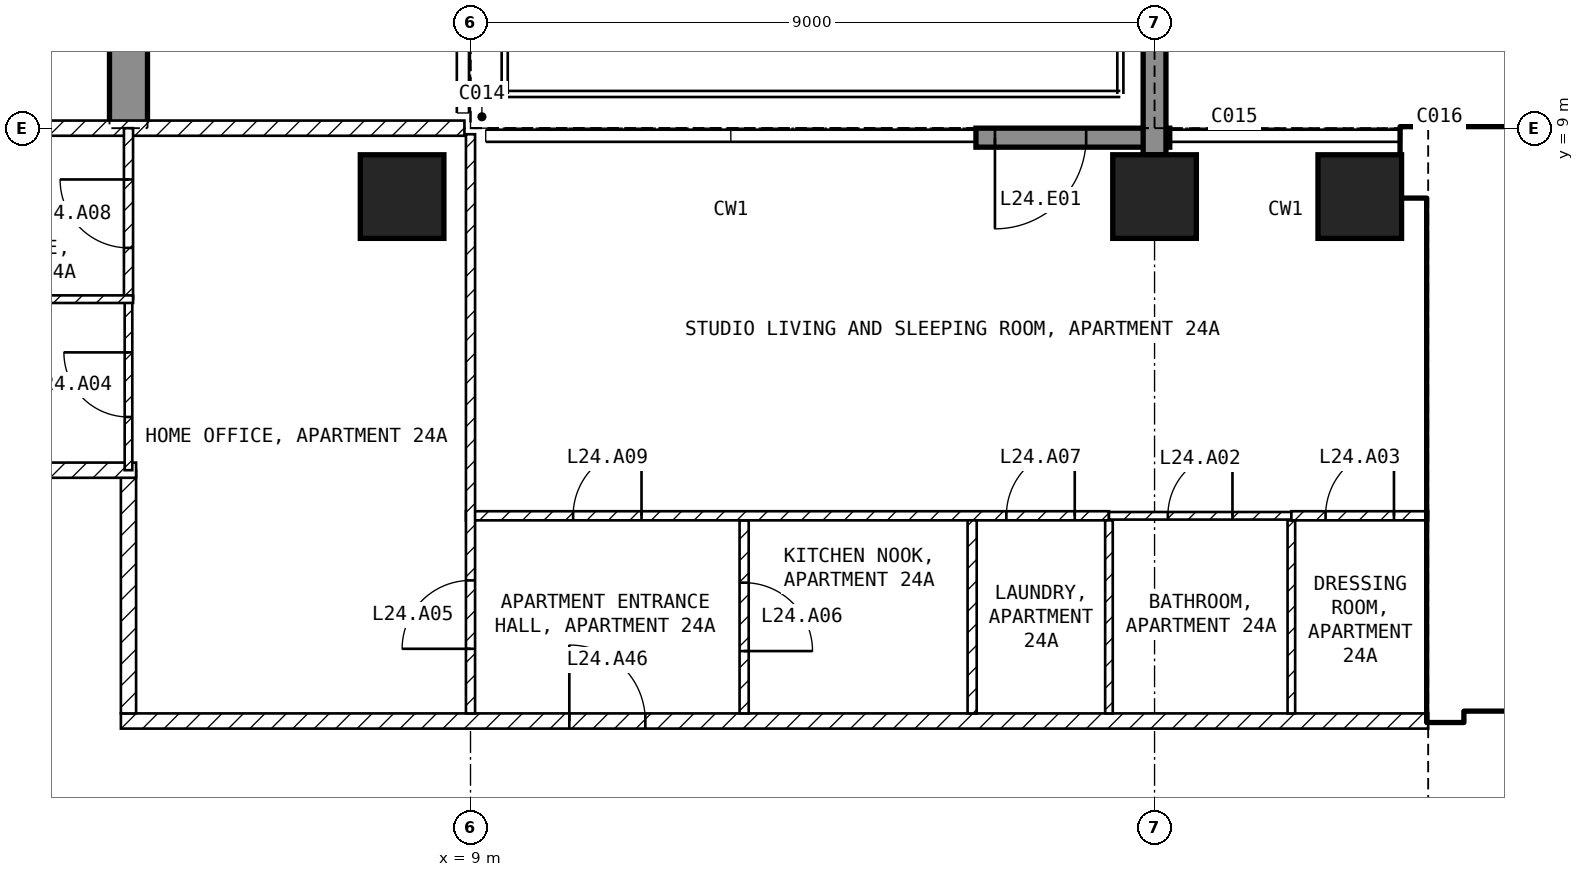
"""IFC4 building model, lengths in metres.
Left out: names, types, materials, properties, quantities, classifications, styles, units other than length and angle.
Written with IfcOpenShell. Run it as: python <this file> out.ifc"""

import sys

from ifc_helpers import new_model, si_unit, direction, frame, frame_2d, origin, origin_2d, place, context, subcontext, project, spatial, polyline, rectangle, outline, extrude, element, fill, save


model = new_model("IFC4")
c1 = context("Model", 3, precision=1e-05, world=origin(), true_north=direction((0.0, 1.0)))
c2 = subcontext(c1, "Body", "Model", "MODEL_VIEW")
j1 = project(units=[si_unit("LENGTHUNIT", "METRE"), si_unit("PLANEANGLEUNIT", "RADIAN")], contexts=[c1])
p1 = place(None, origin())
s1 = spatial("IfcSite", under=j1, at=p1, CompositionType="ELEMENT")
p2 = place(p1, origin())
s2 = spatial("IfcBuilding", under=s1, at=p2, CompositionType="ELEMENT")
p3 = place(p2, frame((0.0, 0.0, 105.9)))
s3 = spatial("IfcBuildingStorey", under=s2, at=p3, CompositionType="ELEMENT", Elevation=105.9)
for number, where, z_axis, x_axis in (
    (1, (8.1, 8.1, -0.25), (0.0, 0.0, 1.0), (1.0, 0.0, 0.0)),
    (2, (18.0, 8.1, -0.25), (0.0, 0.0, 1.0), (1.0, 0.0, 0.0)),
    (3, (20.7, 8.1, -0.25), (0.0, 0.0, 1.0), (1.0, 0.0, 0.0)),
):
    element("IfcColumn", number, at=place(p3, frame(where, z_axis=z_axis, x_axis=x_axis)), inside=s3, PredefinedType="COLUMN", context=c2, shape_type="SweptSolid", body=[
        extrude(rectangle(XDim=1.1, YDim=1.1, at=origin_2d()), origin(), (0.0, 0.0, 1.0), 3.5),
    ])
p4 = place(p3, frame((4.25, 9.0, -0.25), z_axis=(1.0, 0.0, 0.0), x_axis=(0.0, 1.0, 0.0)))
e4 = element("IfcWall", 4, at=p4, inside=s3, PredefinedType="SHEAR", context=c2, shape_type="SweptSolid", body=[
    extrude(outline(polyline([(0.0, 0.0), (2.1, 0.0), (2.1, 2.65), (4.5, 2.65), (4.5, 0.0), (9.9, 0.0), (9.9, 2.65), (12.3, 2.65), (12.3, 0.0), (16.55, 0.0), (16.55, 3.5), (0.0, 3.5), (0.0, 0.0)])), origin(), (0.0, 0.0, 1.0), 0.5),
])
p5 = place(p3, frame((18.2, 8.875, 0.0), z_axis=(0.0, 0.0, 1.0), x_axis=(-1.0, 0.0, 0.0)))
e5 = element("IfcWall", 5, at=p5, inside=s3, PredefinedType="SOLIDWALL", context=c2, shape_type="SweptSolid", body=[
    extrude(rectangle(XDim=2.55, YDim=0.25, at=frame_2d((1.275, 0.0))), origin(), (0.0, 0.0, 1.0), 3.25),
])
p6 = place(p5, frame((1.1, 0.0, 0.0)))
e6 = element("IfcOpeningElement", 6, at=p6, cuts=e5, PredefinedType="OPENING", context=c2, shape_type="SweptSolid", body=[
    extrude(rectangle(XDim=1.2, YDim=2.4, at=frame_2d((0.6, 1.2))), frame((0.0, 0.135, 0.0), z_axis=(0.0, -1.0, 0.0), x_axis=(1.0, 0.0, 0.0)), (0.0, 0.0, 1.0), 0.27),
])
p7 = place(p3, frame((18.0, 8.65, 0.0), z_axis=(0.0, 0.0, 1.0), x_axis=(0.0, 1.0, 0.0)))
e7 = element("IfcWall", 7, at=p7, inside=s3, PredefinedType="SOLIDWALL", context=c2, shape_type="SweptSolid", body=[
    extrude(rectangle(XDim=3.09, YDim=0.3, at=frame_2d((1.545, 0.0))), origin(), (0.0, 0.0, 1.0), 3.25),
])
p8 = place(p3, frame((21.25, 8.55, 0.0), z_axis=(0.0, 0.0, 1.0), x_axis=(1.0, 0.0, 0.0)))
e8 = element("IfcWall", 8, at=p8, inside=s3, PredefinedType="SHEAR", context=c2, shape_type="SweptSolid", body=[
    extrude(rectangle(XDim=8.2, YDim=0.9, at=frame_2d((4.1, 0.0))), origin(), (0.0, 0.0, 1.0), 3.25),
])
p9 = place(p3, frame((21.825, 1.2, 0.0), z_axis=(0.0, 0.0, 1.0), x_axis=(0.0, 1.0, 0.0)))
e9 = element("IfcWall", 9, at=p9, inside=s3, PredefinedType="SHEAR", context=c2, shape_type="SweptSolid", body=[
    extrude(rectangle(XDim=6.9, YDim=0.45, at=frame_2d((3.45, 0.0))), origin(), (0.0, 0.0, 1.0), 3.25),
])
p10 = place(p3, frame((22.05, 1.45, 0.0), z_axis=(0.0, 0.0, 1.0), x_axis=(1.0, 0.0, 0.0)))
e10 = element("IfcWall", 10, at=p10, inside=s3, PredefinedType="SOLIDWALL", context=c2, shape_type="SweptSolid", body=[
    extrude(rectangle(XDim=11.0, YDim=0.2, at=frame_2d((5.5, 0.0))), origin(), (0.0, 0.0, 1.0), 3.25),
])
p11 = place(p10, frame((0.75, 0.0, 0.0)))
e11 = element("IfcOpeningElement", 11, at=p11, cuts=e10, PredefinedType="OPENING", context=c2, shape_type="SweptSolid", body=[
    extrude(rectangle(XDim=1.0, YDim=2.1, at=frame_2d((0.5, 1.05))), frame((0.0, 0.11, 0.0), z_axis=(0.0, -1.0, 0.0), x_axis=(1.0, 0.0, 0.0)), (0.0, 0.0, 1.0), 0.22),
])
p12 = place(p10, frame((3.25, 0.0, 0.0)))
e12 = element("IfcOpeningElement", 12, at=p12, cuts=e10, PredefinedType="OPENING", context=c2, shape_type="SweptSolid", body=[
    extrude(rectangle(XDim=1.0, YDim=2.1, at=frame_2d((0.5, 1.05))), frame((0.0, 0.11, 0.0), z_axis=(0.0, -1.0, 0.0), x_axis=(1.0, 0.0, 0.0)), (0.0, 0.0, 1.0), 0.22),
])
p13 = place(p10, frame((9.075, 0.0, 0.0)))
e13 = element("IfcOpeningElement", 13, at=p13, cuts=e10, PredefinedType="OPENING", context=c2, shape_type="SweptSolid", body=[
    extrude(rectangle(XDim=0.9, YDim=2.1, at=frame_2d((0.45, 1.05))), frame((0.0, 0.11, 0.0), z_axis=(0.0, -1.0, 0.0), x_axis=(1.0, 0.0, 0.0)), (0.0, 0.0, 1.0), 0.22),
])
p14 = place(p3, frame((22.05, 5.15, 0.0), z_axis=(0.0, 0.0, 1.0), x_axis=(1.0, 0.0, 0.0)))
e14 = element("IfcWall", 14, at=p14, inside=s3, PredefinedType="SOLIDWALL", context=c2, shape_type="SweptSolid", body=[
    extrude(rectangle(XDim=6.3, YDim=0.2, at=frame_2d((3.15, 0.0))), origin(), (0.0, 0.0, 1.0), 3.25),
])
p15 = place(p14, frame((0.2, 0.0, 0.0)))
e15 = element("IfcOpeningElement", 15, at=p15, cuts=e14, PredefinedType="OPENING", context=c2, shape_type="SweptSolid", body=[
    extrude(rectangle(XDim=1.0, YDim=2.1, at=frame_2d((0.5, 1.05))), frame((0.0, 0.11, 0.0), z_axis=(0.0, -1.0, 0.0), x_axis=(1.0, 0.0, 0.0)), (0.0, 0.0, 1.0), 0.22),
])
p16 = place(p3, frame((4.4, 1.2, 0.0), z_axis=(0.0, 0.0, 1.0), x_axis=(1.0, 0.0, 0.0)))
e16 = element("IfcWall", 16, at=p16, inside=s3, PredefinedType="PARTITIONING", context=c2, shape_type="SweptSolid", body=[
    extrude(rectangle(XDim=17.2, YDim=0.2, at=frame_2d((8.6, 0.0))), origin(), (0.0, 0.0, 1.0), 3.25),
])
p17 = place(p16, frame((5.9, 0.0, 0.0)))
e17 = element("IfcOpeningElement", 17, at=p17, cuts=e16, PredefinedType="OPENING", context=c2, shape_type="SweptSolid", body=[
    extrude(rectangle(XDim=1.0, YDim=2.1, at=frame_2d((0.5, 1.05))), frame((0.0, 0.11, 0.0), z_axis=(0.0, -1.0, 0.0), x_axis=(1.0, 0.0, 0.0)), (0.0, 0.0, 1.0), 0.22),
])
p18 = place(p3, frame((4.5, 4.5, 0.0), z_axis=(0.0, 0.0, 1.0), x_axis=(0.0, -1.0, 0.0)))
e18 = element("IfcWall", 18, at=p18, inside=s3, PredefinedType="PARTITIONING", context=c2, shape_type="SweptSolid", body=[
    extrude(rectangle(XDim=3.2, YDim=0.2, at=frame_2d((1.6, 0.0))), origin(), (0.0, 0.0, 1.0), 3.25),
])
p19 = place(p3, frame((1.1, 4.5, 0.0), z_axis=(0.0, 0.0, 1.0), x_axis=(1.0, 0.0, 0.0)))
e19 = element("IfcWall", 19, at=p19, inside=s3, PredefinedType="PARTITIONING", context=c2, shape_type="SweptSolid", body=[
    extrude(rectangle(XDim=3.5, YDim=0.2, at=frame_2d((1.75, 0.0))), origin(), (0.0, 0.0, 1.0), 3.25),
])
p20 = place(p3, frame((-8.92, 9.0, 0.0), z_axis=(0.0, 0.0, 1.0), x_axis=(1.0, 0.0, 0.0)))
e20 = element("IfcWall", 20, at=p20, inside=s3, PredefinedType="PARTITIONING", context=c2, shape_type="SweptSolid", body=[
    extrude(rectangle(XDim=17.84, YDim=0.2, at=frame_2d((8.92, 0.0))), origin(), (0.0, 0.0, 1.0), 3.25),
])
p21 = place(p20, frame((8.42, 0.0, 0.0)))
e21 = element("IfcOpeningElement", 21, at=p21, cuts=e20, PredefinedType="OPENING", context=c2, shape_type="SweptSolid", body=[
    extrude(rectangle(XDim=1.0, YDim=2.1, at=frame_2d((0.5, 1.05))), frame((0.0, 0.11, 0.0), z_axis=(0.0, -1.0, 0.0), x_axis=(1.0, 0.0, 0.0)), (0.0, 0.0, 1.0), 0.22),
])
p22 = place(p3, frame((12.6, 3.84, 0.0), z_axis=(0.0, 0.0, 1.0), x_axis=(0.0, -1.0, 0.0)))
e22 = element("IfcWall", 22, at=p22, inside=s3, PredefinedType="PARTITIONING", context=c2, shape_type="SweptSolid", body=[
    extrude(rectangle(XDim=2.54, YDim=0.12, at=frame_2d((1.27, 0.0))), origin(), (0.0, 0.0, 1.0), 3.25),
])
p23 = place(p22, frame((0.82, 0.0, 0.0)))
e23 = element("IfcOpeningElement", 23, at=p23, cuts=e22, PredefinedType="OPENING", context=c2, shape_type="SweptSolid", body=[
    extrude(rectangle(XDim=0.9, YDim=2.1, at=frame_2d((0.45, 1.05))), frame((0.0, 0.07, 0.0), z_axis=(0.0, -1.0, 0.0), x_axis=(1.0, 0.0, 0.0)), (0.0, 0.0, 1.0), 0.14),
])
p24 = place(p3, frame((8.94, 3.9, 0.0), z_axis=(0.0, 0.0, 1.0), x_axis=(1.0, 0.0, 0.0)))
e24 = element("IfcWall", 24, at=p24, inside=s3, PredefinedType="PARTITIONING", context=c2, shape_type="SweptSolid", body=[
    extrude(rectangle(XDim=8.46, YDim=0.12, at=frame_2d((4.23, 0.0))), origin(), (0.0, 0.0, 1.0), 3.25),
])
p25 = place(p24, frame((7.11, 0.0, 0.0)))
e25 = element("IfcOpeningElement", 25, at=p25, cuts=e24, PredefinedType="OPENING", context=c2, shape_type="SweptSolid", body=[
    extrude(rectangle(XDim=0.9, YDim=2.1, at=frame_2d((0.45, 1.05))), frame((0.0, 0.07, 0.0), z_axis=(0.0, -1.0, 0.0), x_axis=(1.0, 0.0, 0.0)), (0.0, 0.0, 1.0), 0.14),
])
p26 = place(p24, frame((1.41, 0.0, 0.0)))
e26 = element("IfcOpeningElement", 26, at=p26, cuts=e24, PredefinedType="OPENING", context=c2, shape_type="SweptSolid", body=[
    extrude(rectangle(XDim=0.9, YDim=2.1, at=frame_2d((0.45, 1.05))), frame((0.0, 0.07, 0.0), z_axis=(0.0, -1.0, 0.0), x_axis=(1.0, 0.0, 0.0)), (0.0, 0.0, 1.0), 0.14),
])
p27 = place(p3, frame((9.0, 1.3, 0.0), z_axis=(0.0, 0.0, 1.0), x_axis=(0.0, 1.0, 0.0)))
e27 = element("IfcWall", 27, at=p27, inside=s3, PredefinedType="PARTITIONING", context=c2, shape_type="SweptSolid", body=[
    extrude(rectangle(XDim=7.62, YDim=0.12, at=frame_2d((3.81, 0.0))), origin(), (0.0, 0.0, 1.0), 3.25),
])
p28 = place(p27, frame((0.85, 0.0, 0.0)))
e28 = element("IfcOpeningElement", 28, at=p28, cuts=e27, PredefinedType="OPENING", context=c2, shape_type="SweptSolid", body=[
    extrude(rectangle(XDim=0.9, YDim=2.1, at=frame_2d((0.45, 1.05))), frame((0.0, 0.07, 0.0), z_axis=(0.0, -1.0, 0.0), x_axis=(1.0, 0.0, 0.0)), (0.0, 0.0, 1.0), 0.14),
])
p29 = place(p3, frame((15.6, 3.84, 0.0), z_axis=(0.0, 0.0, 1.0), x_axis=(0.0, -1.0, 0.0)))
e29 = element("IfcWall", 29, at=p29, inside=s3, PredefinedType="PARTITIONING", context=c2, shape_type="SweptSolid", body=[
    extrude(rectangle(XDim=2.54, YDim=0.12, at=frame_2d((1.27, 0.0))), origin(), (0.0, 0.0, 1.0), 3.25),
])
for number, where, z_axis, x_axis in (
    (30, (17.4, 3.84, 0.0), (0.0, 0.0, 1.0), (0.0, -1.0, 0.0)),
    (31, (19.8, 3.84, 0.0), (0.0, 0.0, 1.0), (0.0, -1.0, 0.0)),
):
    element("IfcWall", number, at=place(p3, frame(where, z_axis=z_axis, x_axis=x_axis)), inside=s3, PredefinedType="PARTITIONING", context=c2, shape_type="SweptSolid", body=[
        extrude(rectangle(XDim=2.54, YDim=0.1, at=frame_2d((1.27, 0.0))), origin(), (0.0, 0.0, 1.0), 3.25),
    ])
p30 = place(p3, frame((17.4, 3.9, 0.0), z_axis=(0.0, 0.0, 1.0), x_axis=(1.0, 0.0, 0.0)))
e32 = element("IfcWall", 32, at=p30, inside=s3, PredefinedType="PARTITIONING", context=c2, shape_type="SweptSolid", body=[
    extrude(rectangle(XDim=2.4, YDim=0.1, at=frame_2d((1.2, 0.0))), origin(), (0.0, 0.0, 1.0), 3.25),
])
p31 = place(p30, frame((0.775, 0.0, 0.0)))
e33 = element("IfcOpeningElement", 33, at=p31, cuts=e32, PredefinedType="OPENING", context=c2, shape_type="SweptSolid", body=[
    extrude(rectangle(XDim=0.85, YDim=2.1, at=frame_2d((0.425, 1.05))), frame((0.0, 0.06, 0.0), z_axis=(0.0, -1.0, 0.0), x_axis=(1.0, 0.0, 0.0)), (0.0, 0.0, 1.0), 0.12),
])
p32 = place(p3, frame((19.8, 3.9, 0.0), z_axis=(0.0, 0.0, 1.0), x_axis=(1.0, 0.0, 0.0)))
e34 = element("IfcWall", 34, at=p32, inside=s3, PredefinedType="PARTITIONING", context=c2, shape_type="SweptSolid", body=[
    extrude(rectangle(XDim=1.8, YDim=0.12, at=frame_2d((0.9, 0.0))), origin(), (0.0, 0.0, 1.0), 3.25),
])
p33 = place(p32, frame((0.45, 0.0, 0.0)))
e35 = element("IfcOpeningElement", 35, at=p33, cuts=e34, PredefinedType="OPENING", context=c2, shape_type="SweptSolid", body=[
    extrude(rectangle(XDim=0.9, YDim=2.1, at=frame_2d((0.45, 1.05))), frame((0.0, 0.07, 0.0), z_axis=(0.0, -1.0, 0.0), x_axis=(1.0, 0.0, 0.0)), (0.0, 0.0, 1.0), 0.14),
])
p34 = place(p3, frame((4.5, 4.5, 0.0), z_axis=(0.0, 0.0, 1.0), x_axis=(0.0, 1.0, 0.0)))
e36 = element("IfcWall", 36, at=p34, inside=s3, PredefinedType="PARTITIONING", context=c2, shape_type="SweptSolid", body=[
    extrude(rectangle(XDim=2.25, YDim=0.1, at=frame_2d((1.125, 0.0))), origin(), (0.0, 0.0, 1.0), 3.25),
])
p35 = place(p34, frame((0.7, 0.0, 0.0)))
e37 = element("IfcOpeningElement", 37, at=p35, cuts=e36, PredefinedType="OPENING", context=c2, shape_type="SweptSolid", body=[
    extrude(rectangle(XDim=0.85, YDim=2.1, at=frame_2d((0.425, 1.05))), frame((0.0, 0.06, 0.0), z_axis=(0.0, -1.0, 0.0), x_axis=(1.0, 0.0, 0.0)), (0.0, 0.0, 1.0), 0.12),
])
p36 = place(p3, frame((4.5, 6.75, 0.0), z_axis=(0.0, 0.0, 1.0), x_axis=(0.0, 1.0, 0.0)))
e38 = element("IfcWall", 38, at=p36, inside=s3, PredefinedType="PARTITIONING", context=c2, shape_type="SweptSolid", body=[
    extrude(rectangle(XDim=2.25, YDim=0.12, at=frame_2d((1.125, 0.0))), origin(), (0.0, 0.0, 1.0), 3.25),
])
p37 = place(p36, frame((0.675, 0.0, 0.0)))
e39 = element("IfcOpeningElement", 39, at=p37, cuts=e38, PredefinedType="OPENING", context=c2, shape_type="SweptSolid", body=[
    extrude(rectangle(XDim=0.9, YDim=2.1, at=frame_2d((0.45, 1.05))), frame((0.0, 0.07, 0.0), z_axis=(0.0, -1.0, 0.0), x_axis=(1.0, 0.0, 0.0)), (0.0, 0.0, 1.0), 0.14),
])
p38 = place(p3, frame((1.1, 6.75, 0.0), z_axis=(0.0, 0.0, 1.0), x_axis=(1.0, 0.0, 0.0)))
e40 = element("IfcWall", 40, at=p38, inside=s3, PredefinedType="PARTITIONING", context=c2, shape_type="SweptSolid", body=[
    extrude(rectangle(XDim=3.46, YDim=0.1, at=frame_2d((1.73, 0.0))), origin(), (0.0, 0.0, 1.0), 3.25),
])
p39 = place(p6, origin())
e41 = element("IfcDoor", 41, at=p39, inside=s3, OperationType="SINGLE_SWING_RIGHT", PredefinedType="DOOR", context=c2, shape_type="SweptSolid", body=[
    extrude(rectangle(XDim=1.2, YDim=2.4, at=frame_2d((0.6, 1.2))), frame((0.0, 0.025, 0.0), z_axis=(0.0, -1.0, 0.0), x_axis=(1.0, 0.0, 0.0)), (0.0, 0.0, 1.0), 0.05),
])
fill(e6, e41)
p40 = place(p15, origin())
e42 = element("IfcDoor", 42, at=p40, inside=s3, OperationType="SINGLE_SWING_LEFT", PredefinedType="DOOR", context=c2, shape_type="SweptSolid", body=[
    extrude(rectangle(XDim=1.0, YDim=2.1, at=frame_2d((0.5, 1.05))), frame((0.0, 0.025, 0.0), z_axis=(0.0, -1.0, 0.0), x_axis=(1.0, 0.0, 0.0)), (0.0, 0.0, 1.0), 0.05),
])
fill(e15, e42)
p41 = place(p31, origin())
e43 = element("IfcDoor", 43, at=p41, inside=s3, OperationType="SINGLE_SWING_RIGHT", PredefinedType="DOOR", context=c2, shape_type="SweptSolid", body=[
    extrude(rectangle(XDim=0.85, YDim=2.1, at=frame_2d((0.425, 1.05))), frame((0.0, 0.025, 0.0), z_axis=(0.0, -1.0, 0.0), x_axis=(1.0, 0.0, 0.0)), (0.0, 0.0, 1.0), 0.05),
])
fill(e33, e43)
p42 = place(p33, origin())
e44 = element("IfcDoor", 44, at=p42, inside=s3, OperationType="SINGLE_SWING_RIGHT", PredefinedType="DOOR", context=c2, shape_type="SweptSolid", body=[
    extrude(rectangle(XDim=0.9, YDim=2.1, at=frame_2d((0.45, 1.05))), frame((0.0, 0.025, 0.0), z_axis=(0.0, -1.0, 0.0), x_axis=(1.0, 0.0, 0.0)), (0.0, 0.0, 1.0), 0.05),
])
fill(e35, e44)
p43 = place(p35, origin())
e45 = element("IfcDoor", 45, at=p43, inside=s3, OperationType="SINGLE_SWING_RIGHT", PredefinedType="DOOR", context=c2, shape_type="SweptSolid", body=[
    extrude(rectangle(XDim=0.85, YDim=2.1, at=frame_2d((0.425, 1.05))), frame((0.0, 0.025, 0.0), z_axis=(0.0, -1.0, 0.0), x_axis=(1.0, 0.0, 0.0)), (0.0, 0.0, 1.0), 0.05),
])
fill(e37, e45)
p44 = place(p28, origin())
e46 = element("IfcDoor", 46, at=p44, inside=s3, OperationType="SINGLE_SWING_LEFT", PredefinedType="DOOR", context=c2, shape_type="SweptSolid", body=[
    extrude(rectangle(XDim=0.9, YDim=2.1, at=frame_2d((0.45, 1.05))), frame((0.0, 0.025, 0.0), z_axis=(0.0, -1.0, 0.0), x_axis=(1.0, 0.0, 0.0)), (0.0, 0.0, 1.0), 0.05),
])
fill(e28, e46)
p45 = place(p23, origin())
e47 = element("IfcDoor", 47, at=p45, inside=s3, OperationType="SINGLE_SWING_RIGHT", PredefinedType="DOOR", context=c2, shape_type="SweptSolid", body=[
    extrude(rectangle(XDim=0.9, YDim=2.1, at=frame_2d((0.45, 1.05))), frame((0.0, 0.025, 0.0), z_axis=(0.0, -1.0, 0.0), x_axis=(1.0, 0.0, 0.0)), (0.0, 0.0, 1.0), 0.05),
])
fill(e23, e47)
p46 = place(p25, origin())
e48 = element("IfcDoor", 48, at=p46, inside=s3, OperationType="SINGLE_SWING_RIGHT", PredefinedType="DOOR", context=c2, shape_type="SweptSolid", body=[
    extrude(rectangle(XDim=0.9, YDim=2.1, at=frame_2d((0.45, 1.05))), frame((0.0, 0.025, 0.0), z_axis=(0.0, -1.0, 0.0), x_axis=(1.0, 0.0, 0.0)), (0.0, 0.0, 1.0), 0.05),
])
fill(e25, e48)
p47 = place(p37, origin())
e49 = element("IfcDoor", 49, at=p47, inside=s3, OperationType="SINGLE_SWING_RIGHT", PredefinedType="DOOR", context=c2, shape_type="SweptSolid", body=[
    extrude(rectangle(XDim=0.9, YDim=2.1, at=frame_2d((0.45, 1.05))), frame((0.0, 0.025, 0.0), z_axis=(0.0, -1.0, 0.0), x_axis=(1.0, 0.0, 0.0)), (0.0, 0.0, 1.0), 0.05),
])
fill(e39, e49)
p48 = place(p26, origin())
e50 = element("IfcDoor", 50, at=p48, inside=s3, OperationType="SINGLE_SWING_RIGHT", PredefinedType="DOOR", context=c2, shape_type="SweptSolid", body=[
    extrude(rectangle(XDim=0.9, YDim=2.1, at=frame_2d((0.45, 1.05))), frame((0.0, 0.025, 0.0), z_axis=(0.0, -1.0, 0.0), x_axis=(1.0, 0.0, 0.0)), (0.0, 0.0, 1.0), 0.05),
])
fill(e26, e50)
p49 = place(p17, origin())
e51 = element("IfcDoor", 51, at=p49, inside=s3, OperationType="SINGLE_SWING_LEFT", PredefinedType="DOOR", context=c2, shape_type="SweptSolid", body=[
    extrude(rectangle(XDim=1.0, YDim=2.1, at=frame_2d((0.5, 1.05))), frame((0.0, 0.025, 0.0), z_axis=(0.0, -1.0, 0.0), x_axis=(1.0, 0.0, 0.0)), (0.0, 0.0, 1.0), 0.05),
])
fill(e17, e51)
save(model, sys.argv[1])
